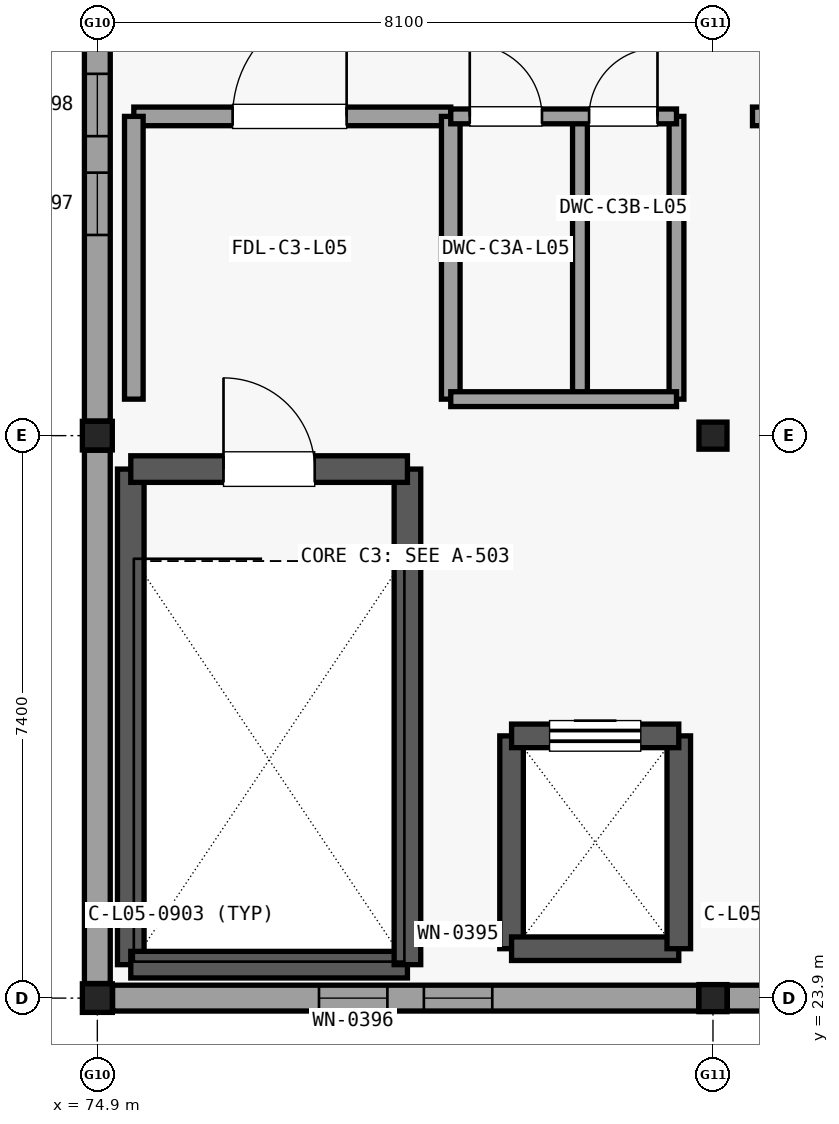
"""IFC4 building model, lengths in metres.
Left out: names, types, materials, properties, quantities, classifications, styles, units other than length and angle.
Written with IfcOpenShell. Run it as: python <this file> out.ifc"""

import sys

from ifc_helpers import new_model, si_unit, direction, frame, frame_2d, origin, origin_2d, place, context, subcontext, project, spatial, rectangle, i_section, extrude, element, fill, save


model = new_model("IFC4")
c1 = context("Model", 3, precision=1e-05, world=origin(), true_north=direction((0.0, 1.0)))
c2 = subcontext(c1, "Body", "Model", "MODEL_VIEW")
j1 = project(units=[si_unit("LENGTHUNIT", "METRE"), si_unit("PLANEANGLEUNIT", "RADIAN")], contexts=[c1])
p1 = place(None, origin())
s1 = spatial("IfcSite", under=j1, at=p1, CompositionType="ELEMENT")
p2 = place(p1, origin())
s2 = spatial("IfcBuilding", under=s1, at=p2, CompositionType="ELEMENT")
p3 = place(p2, frame((0.0, 0.0, 21.0)))
s3 = spatial("IfcBuildingStorey", under=s2, at=p3, CompositionType="ELEMENT", Elevation=21.0)
for number, where, z_axis, x_axis in (
    (1, (74.9, 23.9, 0.0), (0.0, 0.0, 1.0), (1.0, 0.0, 0.0)),
    (2, (74.9, 31.3, 0.0), (0.0, 0.0, 1.0), (1.0, 0.0, 0.0)),
):
    element("IfcColumn", number, at=place(p3, frame(where, z_axis=z_axis, x_axis=x_axis)), inside=s3, PredefinedType="COLUMN", context=c2, shape_type="SweptSolid", body=[
        extrude(i_section(OverallWidth=0.394, OverallDepth=0.376, WebThickness=0.017, FlangeThickness=0.028, at=origin_2d()), origin(), (0.0, 0.0, 1.0), 5.4),
    ])
for number, where, z_axis, x_axis in (
    (3, (83.0, 23.9, 0.0), (0.0, 0.0, 1.0), (1.0, 0.0, 0.0)),
    (4, (83.0, 31.3, 0.0), (0.0, 0.0, 1.0), (1.0, 0.0, 0.0)),
):
    element("IfcColumn", number, at=place(p3, frame(where, z_axis=z_axis, x_axis=x_axis)), inside=s3, PredefinedType="COLUMN", context=c2, shape_type="SweptSolid", body=[
        extrude(i_section(OverallWidth=0.369, OverallDepth=0.356, WebThickness=0.011, FlangeThickness=0.018, at=origin_2d()), origin(), (0.0, 0.0, 1.0), 5.19),
    ])
p4 = place(p3, frame((99.003, 23.9, 5.18), z_axis=(0.0, 0.0, 1.0), x_axis=(-1.0, 0.0, 0.0)))
e5 = element("IfcWall", 5, at=p4, inside=s3, PredefinedType="SOLIDWALL", context=c2, shape_type="SweptSolid", body=[
    extrude(rectangle(XDim=23.906, YDim=0.32, at=frame_2d((11.953, 0.0))), origin(), (0.0, 0.0, 1.0), 1.57),
])
p5 = place(p3, frame((94.7, 23.9, 6.75), z_axis=(0.0, 0.0, 1.0), x_axis=(-1.0, 0.0, 0.0)))
e6 = element("IfcWall", 6, at=p5, inside=s3, PredefinedType="SOLIDWALL", context=c2, shape_type="SweptSolid", body=[
    extrude(rectangle(XDim=15.3, YDim=0.32, at=frame_2d((7.65, 0.0))), origin(), (0.0, 0.0, 1.0), 4.25),
])
p6 = place(p5, frame((4.875, 0.0, 0.25)))
e7 = element("IfcOpeningElement", 7, at=p6, cuts=e6, PredefinedType="OPENING", context=c2, shape_type="SweptSolid", body=[
    extrude(rectangle(XDim=1.15, YDim=3.6, at=frame_2d((0.575, 1.8))), frame((0.0, 0.17, 0.0), z_axis=(0.0, -1.0, 0.0), x_axis=(1.0, 0.0, 0.0)), (0.0, 0.0, 1.0), 0.34),
])
p7 = place(p5, frame((7.075, 0.0, 0.25)))
e8 = element("IfcOpeningElement", 8, at=p7, cuts=e6, PredefinedType="OPENING", context=c2, shape_type="SweptSolid", body=[
    extrude(rectangle(XDim=1.15, YDim=3.6, at=frame_2d((0.575, 1.8))), frame((0.0, 0.17, 0.0), z_axis=(0.0, -1.0, 0.0), x_axis=(1.0, 0.0, 0.0)), (0.0, 0.0, 1.0), 0.34),
])
p8 = place(p5, frame((9.275, 0.0, 0.25)))
e9 = element("IfcOpeningElement", 9, at=p8, cuts=e6, PredefinedType="OPENING", context=c2, shape_type="SweptSolid", body=[
    extrude(rectangle(XDim=1.15, YDim=3.6, at=frame_2d((0.575, 1.8))), frame((0.0, 0.17, 0.0), z_axis=(0.0, -1.0, 0.0), x_axis=(1.0, 0.0, 0.0)), (0.0, 0.0, 1.0), 0.34),
])
p9 = place(p3, frame((82.812, 23.9, 0.0), z_axis=(0.0, 0.0, 1.0), x_axis=(-1.0, 0.0, 0.0)))
e10 = element("IfcWall", 10, at=p9, inside=s3, PredefinedType="SOLIDWALL", context=c2, shape_type="SweptSolid", body=[
    extrude(rectangle(XDim=7.71, YDim=0.34, at=frame_2d((3.855, 0.0))), origin(), (0.0, 0.0, 1.0), 4.718),
])
p10 = place(p9, frame((2.715, 0.0, 2.35)))
e11 = element("IfcOpeningElement", 11, at=p10, cuts=e10, PredefinedType="OPENING", context=c2, shape_type="SweptSolid", body=[
    extrude(rectangle(XDim=0.9, YDim=1.62, at=frame_2d((0.45, 0.81))), frame((0.0, 0.18, 0.0), z_axis=(0.0, -1.0, 0.0), x_axis=(1.0, 0.0, 0.0)), (0.0, 0.0, 1.0), 0.36),
])
p11 = place(p9, frame((4.095, 0.0, 2.35)))
e12 = element("IfcOpeningElement", 12, at=p11, cuts=e10, PredefinedType="OPENING", context=c2, shape_type="SweptSolid", body=[
    extrude(rectangle(XDim=0.9, YDim=1.62, at=frame_2d((0.45, 0.81))), frame((0.0, 0.18, 0.0), z_axis=(0.0, -1.0, 0.0), x_axis=(1.0, 0.0, 0.0)), (0.0, 0.0, 1.0), 0.36),
])
p12 = place(p3, frame((74.9, 24.092, 0.0), z_axis=(0.0, 0.0, 1.0), x_axis=(0.0, 1.0, 0.0)))
e13 = element("IfcWall", 13, at=p12, inside=s3, PredefinedType="SOLIDWALL", context=c2, shape_type="SweptSolid", body=[
    extrude(rectangle(XDim=7.016, YDim=0.34, at=frame_2d((3.508, 0.0))), origin(), (0.0, 0.0, 1.0), 4.718),
])
p13 = place(p3, frame((74.9, 31.492, 0.0), z_axis=(0.0, 0.0, 1.0), x_axis=(0.0, 1.0, 0.0)))
e14 = element("IfcWall", 14, at=p13, inside=s3, PredefinedType="SOLIDWALL", context=c2, shape_type="SweptSolid", body=[
    extrude(rectangle(XDim=7.016, YDim=0.34, at=frame_2d((3.508, 0.0))), origin(), (0.0, 0.0, 1.0), 4.718),
])
p14 = place(p13, frame((2.448, 0.0, 2.35)))
e15 = element("IfcOpeningElement", 15, at=p14, cuts=e14, PredefinedType="OPENING", context=c2, shape_type="SweptSolid", body=[
    extrude(rectangle(XDim=0.82, YDim=1.54, at=frame_2d((0.41, 0.77))), frame((0.0, 0.18, 0.0), z_axis=(0.0, -1.0, 0.0), x_axis=(1.0, 0.0, 0.0)), (0.0, 0.0, 1.0), 0.36),
])
p15 = place(p13, frame((3.748, 0.0, 2.35)))
e16 = element("IfcOpeningElement", 16, at=p15, cuts=e14, PredefinedType="OPENING", context=c2, shape_type="SweptSolid", body=[
    extrude(rectangle(XDim=0.82, YDim=1.54, at=frame_2d((0.41, 0.77))), frame((0.0, 0.18, 0.0), z_axis=(0.0, -1.0, 0.0), x_axis=(1.0, 0.0, 0.0)), (0.0, 0.0, 1.0), 0.36),
])
p16 = place(p3, frame((90.912, 23.9, 0.0), z_axis=(0.0, 0.0, 1.0), x_axis=(-1.0, 0.0, 0.0)))
e17 = element("IfcWall", 17, at=p16, inside=s3, PredefinedType="SOLIDWALL", context=c2, shape_type="SweptSolid", body=[
    extrude(rectangle(XDim=7.723, YDim=0.34, at=frame_2d((3.862, 0.0))), origin(), (0.0, 0.0, 1.0), 4.718),
])
p17 = place(p16, frame((2.721, 0.0, 2.35)))
e18 = element("IfcOpeningElement", 18, at=p17, cuts=e17, PredefinedType="OPENING", context=c2, shape_type="SweptSolid", body=[
    extrude(rectangle(XDim=0.9, YDim=1.62, at=frame_2d((0.45, 0.81))), frame((0.0, 0.18, 0.0), z_axis=(0.0, -1.0, 0.0), x_axis=(1.0, 0.0, 0.0)), (0.0, 0.0, 1.0), 0.36),
])
p18 = place(p16, frame((4.102, 0.0, 2.35)))
e19 = element("IfcOpeningElement", 19, at=p18, cuts=e17, PredefinedType="OPENING", context=c2, shape_type="SweptSolid", body=[
    extrude(rectangle(XDim=0.9, YDim=1.62, at=frame_2d((0.45, 0.81))), frame((0.0, 0.18, 0.0), z_axis=(0.0, -1.0, 0.0), x_axis=(1.0, 0.0, 0.0)), (0.0, 0.0, 1.0), 0.36),
])
p19 = place(p3, frame((75.34, 24.34, 0.0), z_axis=(0.0, 0.0, 1.0), x_axis=(0.0, 1.0, 0.0)))
e20 = element("IfcWall", 20, at=p19, inside=s3, PredefinedType="SHEAR", context=c2, shape_type="SweptSolid", body=[
    extrude(rectangle(XDim=6.52, YDim=0.35, at=frame_2d((3.26, 0.0))), origin(), (0.0, 0.0, 1.0), 5.185),
])
p20 = place(p3, frame((75.34, 24.34, 0.0), z_axis=(0.0, 0.0, 1.0), x_axis=(1.0, 0.0, 0.0)))
e21 = element("IfcWall", 21, at=p20, inside=s3, PredefinedType="SHEAR", context=c2, shape_type="SweptSolid", body=[
    extrude(rectangle(XDim=3.64, YDim=0.35, at=frame_2d((1.82, 0.0))), origin(), (0.0, 0.0, 1.0), 5.185),
])
p21 = place(p3, frame((78.98, 24.34, 0.0), z_axis=(0.0, 0.0, 1.0), x_axis=(0.0, 1.0, 0.0)))
e22 = element("IfcWall", 22, at=p21, inside=s3, PredefinedType="SHEAR", context=c2, shape_type="SweptSolid", body=[
    extrude(rectangle(XDim=6.52, YDim=0.35, at=frame_2d((3.26, 0.0))), origin(), (0.0, 0.0, 1.0), 5.185),
])
p22 = place(p3, frame((75.34, 30.86, 0.0), z_axis=(0.0, 0.0, 1.0), x_axis=(1.0, 0.0, 0.0)))
e23 = element("IfcWall", 23, at=p22, inside=s3, PredefinedType="SHEAR", context=c2, shape_type="SweptSolid", body=[
    extrude(rectangle(XDim=3.64, YDim=0.35, at=frame_2d((1.82, 0.0))), origin(), (0.0, 0.0, 1.0), 5.185),
])
p23 = place(p22, frame((1.22, 0.0, 0.0)))
e24 = element("IfcOpeningElement", 24, at=p23, cuts=e23, PredefinedType="OPENING", context=c2, shape_type="SweptSolid", body=[
    extrude(rectangle(XDim=1.2, YDim=2.15, at=frame_2d((0.6, 1.075))), frame((0.0, 0.185, 0.0), z_axis=(0.0, -1.0, 0.0), x_axis=(1.0, 0.0, 0.0)), (0.0, 0.0, 1.0), 0.37),
])
p24 = place(p3, frame((80.35, 24.55, 0.0), z_axis=(0.0, 0.0, 1.0), x_axis=(0.0, 1.0, 0.0)))
e25 = element("IfcWall", 25, at=p24, inside=s3, PredefinedType="SHEAR", context=c2, shape_type="SweptSolid", body=[
    extrude(rectangle(XDim=2.8, YDim=0.31, at=frame_2d((1.4, 0.0))), origin(), (0.0, 0.0, 1.0), 5.185),
])
p25 = place(p3, frame((80.35, 24.55, 0.0), z_axis=(0.0, 0.0, 1.0), x_axis=(1.0, 0.0, 0.0)))
e26 = element("IfcWall", 26, at=p25, inside=s3, PredefinedType="SHEAR", context=c2, shape_type="SweptSolid", body=[
    extrude(rectangle(XDim=2.2, YDim=0.31, at=frame_2d((1.1, 0.0))), origin(), (0.0, 0.0, 1.0), 5.185),
])
p26 = place(p3, frame((82.55, 24.55, 0.0), z_axis=(0.0, 0.0, 1.0), x_axis=(0.0, 1.0, 0.0)))
e27 = element("IfcWall", 27, at=p26, inside=s3, PredefinedType="SHEAR", context=c2, shape_type="SweptSolid", body=[
    extrude(rectangle(XDim=2.8, YDim=0.31, at=frame_2d((1.4, 0.0))), origin(), (0.0, 0.0, 1.0), 5.185),
])
p27 = place(p3, frame((80.35, 27.35, 0.0), z_axis=(0.0, 0.0, 1.0), x_axis=(1.0, 0.0, 0.0)))
e28 = element("IfcWall", 28, at=p27, inside=s3, PredefinedType="SHEAR", context=c2, shape_type="SweptSolid", body=[
    extrude(rectangle(XDim=2.2, YDim=0.31, at=frame_2d((1.1, 0.0))), origin(), (0.0, 0.0, 1.0), 5.185),
])
p28 = place(p27, frame((0.5, 0.0, 0.0)))
e29 = element("IfcOpeningElement", 29, at=p28, cuts=e28, PredefinedType="OPENING", context=c2, shape_type="SweptSolid", body=[
    extrude(rectangle(XDim=1.2, YDim=2.15, at=frame_2d((0.6, 1.075))), frame((0.0, 0.165, 0.0), z_axis=(0.0, -1.0, 0.0), x_axis=(1.0, 0.0, 0.0)), (0.0, 0.0, 1.0), 0.33),
])
p29 = place(p3, frame((75.38, 35.5, 0.0), z_axis=(0.0, 0.0, 1.0), x_axis=(1.0, 0.0, 0.0)))
e30 = element("IfcWall", 30, at=p29, inside=s3, PredefinedType="PARTITIONING", context=c2, shape_type="SweptSolid", body=[
    extrude(rectangle(XDim=4.17, YDim=0.245, at=frame_2d((2.085, 0.0))), origin(), (0.0, 0.0, 1.0), 4.723),
])
p30 = place(p29, frame((1.3, 0.0, 0.0)))
e31 = element("IfcOpeningElement", 31, at=p30, cuts=e30, PredefinedType="OPENING", context=c2, shape_type="SweptSolid", body=[
    extrude(rectangle(XDim=1.5, YDim=2.15, at=frame_2d((0.75, 1.075))), frame((0.0, 0.133, 0.0), z_axis=(0.0, -1.0, 0.0), x_axis=(1.0, 0.0, 0.0)), (0.0, 0.0, 1.0), 0.265),
])
for number, where, z_axis, x_axis in (
    (32, (75.38, 31.78, 0.0), (0.0, 0.0, 1.0), (0.0, 1.0, 0.0)),
    (33, (79.55, 31.78, 0.0), (0.0, 0.0, 1.0), (0.0, 1.0, 0.0)),
):
    element("IfcWall", number, at=place(p3, frame(where, z_axis=z_axis, x_axis=x_axis)), inside=s3, PredefinedType="PARTITIONING", context=c2, shape_type="SweptSolid", body=[
        extrude(rectangle(XDim=3.72, YDim=0.245, at=frame_2d((1.86, 0.0))), origin(), (0.0, 0.0, 1.0), 4.723),
    ])
for number, where, z_axis, x_axis in (
    (34, (81.25, 31.78, 0.0), (0.0, 0.0, 1.0), (0.0, 1.0, 0.0)),
    (35, (82.52, 31.78, 0.0), (0.0, 0.0, 1.0), (0.0, 1.0, 0.0)),
):
    element("IfcWall", number, at=place(p3, frame(where, z_axis=z_axis, x_axis=x_axis)), inside=s3, PredefinedType="PARTITIONING", context=c2, shape_type="SweptSolid", body=[
        extrude(rectangle(XDim=3.72, YDim=0.195, at=frame_2d((1.86, 0.0))), origin(), (0.0, 0.0, 1.0), 4.723),
    ])
p31 = place(p3, frame((79.55, 31.78, 0.0), z_axis=(0.0, 0.0, 1.0), x_axis=(1.0, 0.0, 0.0)))
e36 = element("IfcWall", 36, at=p31, inside=s3, PredefinedType="PARTITIONING", context=c2, shape_type="SweptSolid", body=[
    extrude(rectangle(XDim=2.97, YDim=0.195, at=frame_2d((1.485, 0.0))), origin(), (0.0, 0.0, 1.0), 4.723),
])
p32 = place(p3, frame((79.55, 35.5, 0.0), z_axis=(0.0, 0.0, 1.0), x_axis=(1.0, 0.0, 0.0)))
e37 = element("IfcWall", 37, at=p32, inside=s3, PredefinedType="PARTITIONING", context=c2, shape_type="SweptSolid", body=[
    extrude(rectangle(XDim=2.97, YDim=0.195, at=frame_2d((1.485, 0.0))), origin(), (0.0, 0.0, 1.0), 5.175),
])
p33 = place(p32, frame((0.25, 0.0, 0.0)))
e38 = element("IfcOpeningElement", 38, at=p33, cuts=e37, PredefinedType="OPENING", context=c2, shape_type="SweptSolid", body=[
    extrude(rectangle(XDim=0.95, YDim=2.1, at=frame_2d((0.475, 1.05))), frame((0.0, 0.107, 0.0), z_axis=(0.0, -1.0, 0.0), x_axis=(1.0, 0.0, 0.0)), (0.0, 0.0, 1.0), 0.215),
])
p34 = place(p32, frame((1.82, 0.0, 0.0)))
e39 = element("IfcOpeningElement", 39, at=p34, cuts=e37, PredefinedType="OPENING", context=c2, shape_type="SweptSolid", body=[
    extrude(rectangle(XDim=0.9, YDim=2.1, at=frame_2d((0.45, 1.05))), frame((0.0, 0.107, 0.0), z_axis=(0.0, -1.0, 0.0), x_axis=(1.0, 0.0, 0.0)), (0.0, 0.0, 1.0), 0.215),
])
p35 = place(p3, frame((83.52, 35.5, 0.0), z_axis=(0.0, 0.0, 1.0), x_axis=(1.0, 0.0, 0.0)))
e40 = element("IfcWall", 40, at=p35, inside=s3, PredefinedType="PARTITIONING", context=c2, shape_type="SweptSolid", body=[
    extrude(rectangle(XDim=7.06, YDim=0.245, at=frame_2d((3.53, 0.0))), origin(), (0.0, 0.0, 1.0), 5.175),
])
p36 = place(p35, frame((2.43, 0.0, 0.0)))
e41 = element("IfcOpeningElement", 41, at=p36, cuts=e40, PredefinedType="OPENING", context=c2, shape_type="SweptSolid", body=[
    extrude(rectangle(XDim=2.2, YDim=2.65, at=frame_2d((1.1, 1.325))), frame((0.0, 0.133, 0.0), z_axis=(0.0, -1.0, 0.0), x_axis=(1.0, 0.0, 0.0)), (0.0, 0.0, 1.0), 0.265),
])
p37 = place(p10, origin())
e42 = element("IfcWindow", 42, at=p37, inside=s3, PartitioningType="SINGLE_PANEL", PredefinedType="WINDOW", context=c2, shape_type="SweptSolid", body=[
    extrude(rectangle(XDim=0.9, YDim=1.62, at=frame_2d((0.45, 0.81))), frame((0.0, 0.03, 0.0), z_axis=(0.0, -1.0, 0.0), x_axis=(1.0, 0.0, 0.0)), (0.0, 0.0, 1.0), 0.06),
])
fill(e11, e42)
p38 = place(p11, origin())
e43 = element("IfcWindow", 43, at=p38, inside=s3, PartitioningType="SINGLE_PANEL", PredefinedType="WINDOW", context=c2, shape_type="SweptSolid", body=[
    extrude(rectangle(XDim=0.9, YDim=1.62, at=frame_2d((0.45, 0.81))), frame((0.0, 0.03, 0.0), z_axis=(0.0, -1.0, 0.0), x_axis=(1.0, 0.0, 0.0)), (0.0, 0.0, 1.0), 0.06),
])
fill(e12, e43)
p39 = place(p14, origin())
e44 = element("IfcWindow", 44, at=p39, inside=s3, PartitioningType="SINGLE_PANEL", PredefinedType="WINDOW", context=c2, shape_type="SweptSolid", body=[
    extrude(rectangle(XDim=0.82, YDim=1.54, at=frame_2d((0.41, 0.77))), frame((0.0, 0.03, 0.0), z_axis=(0.0, -1.0, 0.0), x_axis=(1.0, 0.0, 0.0)), (0.0, 0.0, 1.0), 0.06),
])
fill(e15, e44)
p40 = place(p15, origin())
e45 = element("IfcWindow", 45, at=p40, inside=s3, PartitioningType="SINGLE_PANEL", PredefinedType="WINDOW", context=c2, shape_type="SweptSolid", body=[
    extrude(rectangle(XDim=0.82, YDim=1.54, at=frame_2d((0.41, 0.77))), frame((0.0, 0.03, 0.0), z_axis=(0.0, -1.0, 0.0), x_axis=(1.0, 0.0, 0.0)), (0.0, 0.0, 1.0), 0.06),
])
fill(e16, e45)
p41 = place(p23, origin())
e46 = element("IfcDoor", 46, at=p41, inside=s3, OperationType="SINGLE_SWING_LEFT", PredefinedType="DOOR", context=c2, shape_type="SweptSolid", body=[
    extrude(rectangle(XDim=1.2, YDim=2.15, at=frame_2d((0.6, 1.075))), frame((0.0, 0.025, 0.0), z_axis=(0.0, -1.0, 0.0), x_axis=(1.0, 0.0, 0.0)), (0.0, 0.0, 1.0), 0.05),
])
fill(e24, e46)
p42 = place(p28, origin())
e47 = element("IfcDoor", 47, at=p42, inside=s3, OperationType="SLIDING_TO_LEFT", PredefinedType="DOOR", context=c2, shape_type="SweptSolid", body=[
    extrude(rectangle(XDim=1.2, YDim=2.15, at=frame_2d((0.6, 1.075))), frame((0.0, 0.025, 0.0), z_axis=(0.0, -1.0, 0.0), x_axis=(1.0, 0.0, 0.0)), (0.0, 0.0, 1.0), 0.05),
])
fill(e29, e47)
p43 = place(p30, origin())
e48 = element("IfcDoor", 48, at=p43, inside=s3, OperationType="SINGLE_SWING_RIGHT", PredefinedType="DOOR", context=c2, shape_type="SweptSolid", body=[
    extrude(rectangle(XDim=1.5, YDim=2.15, at=frame_2d((0.75, 1.075))), frame((0.0, 0.025, 0.0), z_axis=(0.0, -1.0, 0.0), x_axis=(1.0, 0.0, 0.0)), (0.0, 0.0, 1.0), 0.05),
])
fill(e31, e48)
p44 = place(p33, origin())
e49 = element("IfcDoor", 49, at=p44, inside=s3, OperationType="SINGLE_SWING_LEFT", PredefinedType="DOOR", context=c2, shape_type="SweptSolid", body=[
    extrude(rectangle(XDim=0.95, YDim=2.1, at=frame_2d((0.475, 1.05))), frame((0.0, 0.025, 0.0), z_axis=(0.0, -1.0, 0.0), x_axis=(1.0, 0.0, 0.0)), (0.0, 0.0, 1.0), 0.05),
])
fill(e38, e49)
p45 = place(p34, origin())
e50 = element("IfcDoor", 50, at=p45, inside=s3, OperationType="SINGLE_SWING_RIGHT", PredefinedType="DOOR", context=c2, shape_type="SweptSolid", body=[
    extrude(rectangle(XDim=0.9, YDim=2.1, at=frame_2d((0.45, 1.05))), frame((0.0, 0.025, 0.0), z_axis=(0.0, -1.0, 0.0), x_axis=(1.0, 0.0, 0.0)), (0.0, 0.0, 1.0), 0.05),
])
fill(e39, e50)
save(model, sys.argv[1])
